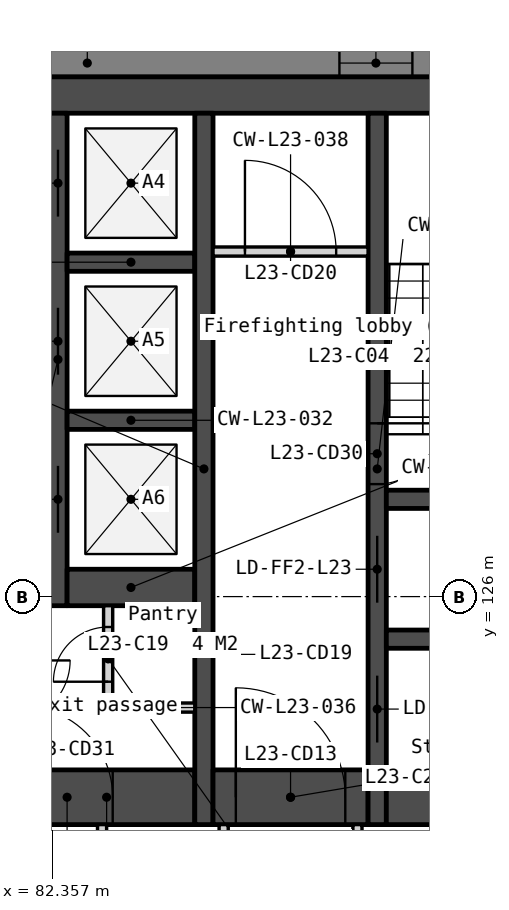
"""IFC4 building model, lengths in metres.
Left out: names, types, materials, properties, quantities, classifications, styles, units other than length and angle.
Written with IfcOpenShell. Run it as: python <this file> out.ifc"""

import sys

from ifc_helpers import new_model, si_unit, direction, frame, frame_2d, origin, place, context, subcontext, project, spatial, polyline, rectangle, outline, extrude, element, fill, save


model = new_model("IFC4")
c1 = context("Model", 3, precision=1e-05, world=origin(), true_north=direction((0.0, 1.0)))
c2 = subcontext(c1, "Body", "Model", "MODEL_VIEW")
j1 = project(units=[si_unit("LENGTHUNIT", "METRE"), si_unit("PLANEANGLEUNIT", "RADIAN")], contexts=[c1])
p1 = place(None, origin())
s1 = spatial("IfcSite", under=j1, at=p1, CompositionType="ELEMENT")
p2 = place(p1, origin())
s2 = spatial("IfcBuilding", under=s1, at=p2, CompositionType="ELEMENT")
p3 = place(p2, frame((0.0, 0.0, 95.8)))
s3 = spatial("IfcBuildingStorey", under=s2, at=p3, CompositionType="ELEMENT", Elevation=95.8)
p4 = place(p3, frame((66.0, 134.25, 0.0), z_axis=(0.0, 0.0, 1.0), x_axis=(1.0, 0.0, 0.0)))
e1 = element("IfcWall", 1, at=p4, inside=s3, PredefinedType="SOLIDWALL", context=c2, shape_type="SweptSolid", body=[
    extrude(rectangle(XDim=28.0, YDim=0.6, at=frame_2d((14.0, 0.0))), origin(), (0.0, 0.0, 1.0), 3.35),
])
p5 = place(p3, frame((81.8, 122.7, 0.0), z_axis=(0.0, 0.0, 1.0), x_axis=(1.0, 0.0, 0.0)))
e2 = element("IfcWall", 2, at=p5, inside=s3, PredefinedType="SOLIDWALL", context=c2, shape_type="SweptSolid", body=[
    extrude(rectangle(XDim=2.9, YDim=0.9, at=frame_2d((1.45, 0.0))), origin(), (0.0, 0.0, 1.0), 3.35),
])
p6 = place(p5, frame((0.05, 0.0, 0.0)))
e3 = element("IfcOpeningElement", 3, at=p6, cuts=e2, PredefinedType="OPENING", context=c2, shape_type="SweptSolid", body=[
    extrude(rectangle(XDim=1.5, YDim=2.1, at=frame_2d((0.75, 1.05))), frame((0.0, 0.46, 0.0), z_axis=(0.0, -1.0, 0.0), x_axis=(1.0, 0.0, 0.0)), (0.0, 0.0, 1.0), 0.92),
])
p7 = place(p3, frame((82.45, 133.95, 0.0), z_axis=(0.0, 0.0, 1.0), x_axis=(0.0, -1.0, 0.0)))
e4 = element("IfcWall", 4, at=p7, inside=s3, PredefinedType="SOLIDWALL", context=c2, shape_type="SweptSolid", body=[
    extrude(rectangle(XDim=8.1, YDim=0.3, at=frame_2d((4.05, 0.0))), origin(), (0.0, 0.0, 1.0), 3.35),
])
p8 = place(p7, frame((0.6, 0.0, 0.0)))
e5 = element("IfcOpeningElement", 5, at=p8, cuts=e4, PredefinedType="OPENING", context=c2, shape_type="SweptSolid", body=[
    extrude(rectangle(XDim=1.1, YDim=2.1, at=frame_2d((0.55, 1.05))), frame((0.0, 0.16, 0.0), z_axis=(0.0, -1.0, 0.0), x_axis=(1.0, 0.0, 0.0)), (0.0, 0.0, 1.0), 0.32),
])
p9 = place(p7, frame((3.2, 0.0, 0.0)))
e6 = element("IfcOpeningElement", 6, at=p9, cuts=e4, PredefinedType="OPENING", context=c2, shape_type="SweptSolid", body=[
    extrude(rectangle(XDim=1.1, YDim=2.1, at=frame_2d((0.55, 1.05))), frame((0.0, 0.16, 0.0), z_axis=(0.0, -1.0, 0.0), x_axis=(1.0, 0.0, 0.0)), (0.0, 0.0, 1.0), 0.32),
])
p10 = place(p7, frame((5.8, 0.0, 0.0)))
e7 = element("IfcOpeningElement", 7, at=p10, cuts=e4, PredefinedType="OPENING", context=c2, shape_type="SweptSolid", body=[
    extrude(rectangle(XDim=1.1, YDim=2.1, at=frame_2d((0.55, 1.05))), frame((0.0, 0.16, 0.0), z_axis=(0.0, -1.0, 0.0), x_axis=(1.0, 0.0, 0.0)), (0.0, 0.0, 1.0), 0.32),
])
for number, where, z_axis, x_axis in (
    (8, (82.6, 131.5, 0.0), (0.0, 0.0, 1.0), (1.0, 0.0, 0.0)),
    (9, (82.6, 128.9, 0.0), (0.0, 0.0, 1.0), (1.0, 0.0, 0.0)),
):
    element("IfcWall", number, at=place(p3, frame(where, z_axis=z_axis, x_axis=x_axis)), inside=s3, PredefinedType="SOLIDWALL", context=c2, shape_type="SweptSolid", body=[
        extrude(rectangle(XDim=2.1, YDim=0.3, at=frame_2d((1.05, 0.0))), origin(), (0.0, 0.0, 1.0), 3.35),
    ])
p11 = place(p3, frame((82.6, 126.15, 0.0), z_axis=(0.0, 0.0, 1.0), x_axis=(1.0, 0.0, 0.0)))
e10 = element("IfcWall", 10, at=p11, inside=s3, PredefinedType="SOLIDWALL", context=c2, shape_type="SweptSolid", body=[
    extrude(rectangle(XDim=2.1, YDim=0.6, at=frame_2d((1.05, 0.0))), origin(), (0.0, 0.0, 1.0), 3.35),
])
p12 = place(p3, frame((83.175, 122.25, 0.0), z_axis=(0.0, 0.0, 1.0), x_axis=(0.0, -1.0, 0.0)))
e11 = element("IfcWall", 11, at=p12, inside=s3, PredefinedType="PARTITIONING", context=c2, shape_type="SweptSolid", body=[
    extrude(rectangle(XDim=2.1, YDim=0.15, at=frame_2d((1.05, 0.0))), origin(), (0.0, 0.0, 1.0), 3.35),
])
p13 = place(p3, frame((83.275, 125.85, 0.0), z_axis=(0.0, 0.0, 1.0), x_axis=(0.0, -1.0, 0.0)))
e12 = element("IfcWall", 12, at=p13, inside=s3, PredefinedType="PARTITIONING", context=c2, shape_type="SweptSolid", body=[
    extrude(rectangle(XDim=1.75, YDim=0.15, at=frame_2d((0.875, 0.0))), origin(), (0.0, 0.0, 1.0), 3.35),
])
p14 = place(p13, frame((0.35, 0.0, 0.0)))
e13 = element("IfcOpeningElement", 13, at=p14, cuts=e12, PredefinedType="OPENING", context=c2, shape_type="SweptSolid", body=[
    extrude(rectangle(XDim=0.9, YDim=2.1, at=frame_2d((0.45, 1.05))), frame((0.0, 0.085, 0.0), z_axis=(0.0, -1.0, 0.0), x_axis=(1.0, 0.0, 0.0)), (0.0, 0.0, 1.0), 0.17),
])
p15 = place(p3, frame((83.35, 124.175, 0.0), z_axis=(0.0, 0.0, 1.0), x_axis=(1.0, 0.0, 0.0)))
e14 = element("IfcWall", 14, at=p15, inside=s3, PredefinedType="PARTITIONING", context=c2, shape_type="SweptSolid", body=[
    extrude(rectangle(XDim=1.35, YDim=0.15, at=frame_2d((0.675, 0.0))), origin(), (0.0, 0.0, 1.0), 3.35),
])
p16 = place(p3, frame((84.85, 133.95, 0.0), z_axis=(0.0, 0.0, 1.0), x_axis=(0.0, -1.0, 0.0)))
e15 = element("IfcWall", 15, at=p16, inside=s3, PredefinedType="SOLIDWALL", context=c2, shape_type="SweptSolid", body=[
    extrude(rectangle(XDim=11.7, YDim=0.3, at=frame_2d((5.85, 0.0))), origin(), (0.0, 0.0, 1.0), 3.35),
])
p17 = place(p3, frame((85.0, 131.675, 0.0), z_axis=(0.0, 0.0, 1.0), x_axis=(1.0, 0.0, 0.0)))
e16 = element("IfcWall", 16, at=p17, inside=s3, PredefinedType="PARTITIONING", context=c2, shape_type="SweptSolid", body=[
    extrude(rectangle(XDim=2.55, YDim=0.15, at=frame_2d((1.275, 0.0))), origin(), (0.0, 0.0, 1.0), 3.35),
])
p18 = place(p17, frame((0.525, 0.0, 0.0)))
e17 = element("IfcOpeningElement", 17, at=p18, cuts=e16, PredefinedType="OPENING", context=c2, shape_type="SweptSolid", body=[
    extrude(rectangle(XDim=1.5, YDim=2.1, at=frame_2d((0.75, 1.05))), frame((0.0, 0.085, 0.0), z_axis=(0.0, -1.0, 0.0), x_axis=(1.0, 0.0, 0.0)), (0.0, 0.0, 1.0), 0.17),
])
p19 = place(p3, frame((85.0, 122.7, 0.0), z_axis=(0.0, 0.0, 1.0), x_axis=(1.0, 0.0, 0.0)))
e18 = element("IfcWall", 18, at=p19, inside=s3, PredefinedType="SOLIDWALL", context=c2, shape_type="SweptSolid", body=[
    extrude(rectangle(XDim=2.55, YDim=0.9, at=frame_2d((1.275, 0.0))), origin(), (0.0, 0.0, 1.0), 3.35),
])
p20 = place(p19, frame((0.375, 0.0, 0.0)))
e19 = element("IfcOpeningElement", 19, at=p20, cuts=e18, PredefinedType="OPENING", context=c2, shape_type="SweptSolid", body=[
    extrude(rectangle(XDim=1.8, YDim=2.1, at=frame_2d((0.9, 1.05))), frame((0.0, 0.46, 0.0), z_axis=(0.0, -1.0, 0.0), x_axis=(1.0, 0.0, 0.0)), (0.0, 0.0, 1.0), 0.92),
])
p21 = place(p3, frame((85.175, 122.25, 0.0), z_axis=(0.0, 0.0, 1.0), x_axis=(0.0, -1.0, 0.0)))
e20 = element("IfcWall", 20, at=p21, inside=s3, PredefinedType="PARTITIONING", context=c2, shape_type="SweptSolid", body=[
    extrude(rectangle(XDim=2.1, YDim=0.15, at=frame_2d((1.05, 0.0))), origin(), (0.0, 0.0, 1.0), 3.35),
])
p22 = place(p21, frame((0.55, 0.0, 0.0)))
e21 = element("IfcOpeningElement", 21, at=p22, cuts=e20, PredefinedType="OPENING", context=c2, shape_type="SweptSolid", body=[
    extrude(rectangle(XDim=1.0, YDim=2.1, at=frame_2d((0.5, 1.05))), frame((0.0, 0.085, 0.0), z_axis=(0.0, -1.0, 0.0), x_axis=(1.0, 0.0, 0.0)), (0.0, 0.0, 1.0), 0.17),
])
p23 = place(p3, frame((87.375, 122.25, 0.0), z_axis=(0.0, 0.0, 1.0), x_axis=(0.0, -1.0, 0.0)))
e22 = element("IfcWall", 22, at=p23, inside=s3, PredefinedType="PARTITIONING", context=c2, shape_type="SweptSolid", body=[
    extrude(rectangle(XDim=2.1, YDim=0.15, at=frame_2d((1.05, 0.0))), origin(), (0.0, 0.0, 1.0), 3.35),
])
p24 = place(p3, frame((87.7, 133.95, 0.0), z_axis=(0.0, 0.0, 1.0), x_axis=(0.0, -1.0, 0.0)))
e23 = element("IfcWall", 23, at=p24, inside=s3, PredefinedType="SOLIDWALL", context=c2, shape_type="SweptSolid", body=[
    extrude(rectangle(XDim=11.7, YDim=0.3, at=frame_2d((5.85, 0.0))), origin(), (0.0, 0.0, 1.0), 3.35),
])
p25 = place(p24, frame((6.95, 0.0, 0.0)))
e24 = element("IfcOpeningElement", 24, at=p25, cuts=e23, PredefinedType="OPENING", context=c2, shape_type="SweptSolid", body=[
    extrude(rectangle(XDim=1.1, YDim=2.1, at=frame_2d((0.55, 1.05))), frame((0.0, 0.16, 0.0), z_axis=(0.0, -1.0, 0.0), x_axis=(1.0, 0.0, 0.0)), (0.0, 0.0, 1.0), 0.32),
])
p26 = place(p24, frame((5.1, 0.0, 0.0)))
e25 = element("IfcOpeningElement", 25, at=p26, cuts=e23, PredefinedType="OPENING", context=c2, shape_type="SweptSolid", body=[
    extrude(rectangle(XDim=1.0, YDim=2.1, at=frame_2d((0.5, 1.05))), frame((0.0, 0.16, 0.0), z_axis=(0.0, -1.0, 0.0), x_axis=(1.0, 0.0, 0.0)), (0.0, 0.0, 1.0), 0.32),
])
p27 = place(p24, frame((9.25, 0.0, 0.0)))
e26 = element("IfcOpeningElement", 26, at=p27, cuts=e23, PredefinedType="OPENING", context=c2, shape_type="SweptSolid", body=[
    extrude(rectangle(XDim=1.1, YDim=2.1, at=frame_2d((0.55, 1.05))), frame((0.0, 0.16, 0.0), z_axis=(0.0, -1.0, 0.0), x_axis=(1.0, 0.0, 0.0)), (0.0, 0.0, 1.0), 0.32),
])
for number, where, z_axis, x_axis in (
    (27, (87.85, 127.6, 0.0), (0.0, 0.0, 1.0), (1.0, 0.0, 0.0)),
    (28, (87.85, 125.3, 0.0), (0.0, 0.0, 1.0), (1.0, 0.0, 0.0)),
):
    element("IfcWall", number, at=place(p3, frame(where, z_axis=z_axis, x_axis=x_axis)), inside=s3, PredefinedType="SOLIDWALL", context=c2, shape_type="SweptSolid", body=[
        extrude(rectangle(XDim=2.55, YDim=0.3, at=frame_2d((1.275, 0.0))), origin(), (0.0, 0.0, 1.0), 3.35),
    ])
p28 = place(p3, frame((87.85, 122.7, 0.0), z_axis=(0.0, 0.0, 1.0), x_axis=(1.0, 0.0, 0.0)))
e29 = element("IfcWall", 29, at=p28, inside=s3, PredefinedType="SOLIDWALL", context=c2, shape_type="SweptSolid", body=[
    extrude(rectangle(XDim=2.55, YDim=0.9, at=frame_2d((1.275, 0.0))), origin(), (0.0, 0.0, 1.0), 3.35),
])
p29 = place(p3, frame((101.322, 134.775, -0.15), z_axis=(0.0, 0.0, 1.0), x_axis=(-1.0, 0.0, 0.0)))
e30 = element("IfcWall", 30, at=p29, inside=s3, PredefinedType="SOLIDWALL", context=c2, shape_type="SweptSolid", body=[
    extrude(outline(polyline([(0.0, 0.0), (0.0, 3.5), (36.779, 3.5), (36.779, 0.0), (0.0, 0.0)])), frame((0.0, 0.225, 0.0), z_axis=(0.0, -1.0, 0.0), x_axis=(1.0, 0.0, 0.0)), (0.0, 0.0, 1.0), 0.45),
])
p30 = place(p29, frame((2.814, 0.0, 1.05)))
e31 = element("IfcOpeningElement", 31, at=p30, cuts=e30, PredefinedType="OPENING", context=c2, shape_type="SweptSolid", body=[
    extrude(rectangle(XDim=1.2, YDim=1.5, at=frame_2d((0.6, 0.75))), frame((0.0, 0.235, 0.0), z_axis=(0.0, -1.0, 0.0), x_axis=(1.0, 0.0, 0.0)), (0.0, 0.0, 1.0), 0.47),
])
p31 = place(p29, frame((4.514, 0.0, 1.05)))
e32 = element("IfcOpeningElement", 32, at=p31, cuts=e30, PredefinedType="OPENING", context=c2, shape_type="SweptSolid", body=[
    extrude(rectangle(XDim=1.2, YDim=1.5, at=frame_2d((0.6, 0.75))), frame((0.0, 0.235, 0.0), z_axis=(0.0, -1.0, 0.0), x_axis=(1.0, 0.0, 0.0)), (0.0, 0.0, 1.0), 0.47),
])
p32 = place(p29, frame((11.343, 0.0, 1.05)))
e33 = element("IfcOpeningElement", 33, at=p32, cuts=e30, PredefinedType="OPENING", context=c2, shape_type="SweptSolid", body=[
    extrude(rectangle(XDim=1.2, YDim=1.5, at=frame_2d((0.6, 0.75))), frame((0.0, 0.235, 0.0), z_axis=(0.0, -1.0, 0.0), x_axis=(1.0, 0.0, 0.0)), (0.0, 0.0, 1.0), 0.47),
])
p33 = place(p29, frame((13.043, 0.0, 1.05)))
e34 = element("IfcOpeningElement", 34, at=p33, cuts=e30, PredefinedType="OPENING", context=c2, shape_type="SweptSolid", body=[
    extrude(rectangle(XDim=1.2, YDim=1.5, at=frame_2d((0.6, 0.75))), frame((0.0, 0.235, 0.0), z_axis=(0.0, -1.0, 0.0), x_axis=(1.0, 0.0, 0.0)), (0.0, 0.0, 1.0), 0.47),
])
p34 = place(p29, frame((19.872, 0.0, 1.05)))
e35 = element("IfcOpeningElement", 35, at=p34, cuts=e30, PredefinedType="OPENING", context=c2, shape_type="SweptSolid", body=[
    extrude(rectangle(XDim=1.2, YDim=1.5, at=frame_2d((0.6, 0.75))), frame((0.0, 0.235, 0.0), z_axis=(0.0, -1.0, 0.0), x_axis=(1.0, 0.0, 0.0)), (0.0, 0.0, 1.0), 0.47),
])
p35 = place(p29, frame((21.572, 0.0, 1.05)))
e36 = element("IfcOpeningElement", 36, at=p35, cuts=e30, PredefinedType="OPENING", context=c2, shape_type="SweptSolid", body=[
    extrude(rectangle(XDim=1.2, YDim=1.5, at=frame_2d((0.6, 0.75))), frame((0.0, 0.235, 0.0), z_axis=(0.0, -1.0, 0.0), x_axis=(1.0, 0.0, 0.0)), (0.0, 0.0, 1.0), 0.47),
])
p36 = place(p29, frame((28.4, 0.0, 1.05)))
e37 = element("IfcOpeningElement", 37, at=p36, cuts=e30, PredefinedType="OPENING", context=c2, shape_type="SweptSolid", body=[
    extrude(rectangle(XDim=1.2, YDim=1.5, at=frame_2d((0.6, 0.75))), frame((0.0, 0.235, 0.0), z_axis=(0.0, -1.0, 0.0), x_axis=(1.0, 0.0, 0.0)), (0.0, 0.0, 1.0), 0.47),
])
p37 = place(p29, frame((30.1, 0.0, 1.05)))
e38 = element("IfcOpeningElement", 38, at=p37, cuts=e30, PredefinedType="OPENING", context=c2, shape_type="SweptSolid", body=[
    extrude(rectangle(XDim=1.2, YDim=1.5, at=frame_2d((0.6, 0.75))), frame((0.0, 0.235, 0.0), z_axis=(0.0, -1.0, 0.0), x_axis=(1.0, 0.0, 0.0)), (0.0, 0.0, 1.0), 0.47),
])
p38 = place(p3, frame((82.605, 93.333, -0.15), z_axis=(0.0, 0.0, 1.0), x_axis=(0.500000478905, 0.866025127289, 0.0)))
e39 = element("IfcWall", 39, at=p38, inside=s3, PredefinedType="SOLIDWALL", context=c2, shape_type="SweptSolid", body=[
    extrude(outline(polyline([(42.643, 0.0), (42.643, 3.5), (0.0, 3.5), (0.0, 0.0), (42.643, 0.0)])), frame((0.0, 0.225, 0.0), z_axis=(0.0, -1.0, 0.0), x_axis=(1.0, 0.0, 0.0)), (0.0, 0.0, 1.0), 0.45),
])
p39 = place(p38, frame((2.814, 0.0, 1.05)))
e40 = element("IfcOpeningElement", 40, at=p39, cuts=e39, PredefinedType="OPENING", context=c2, shape_type="SweptSolid", body=[
    extrude(rectangle(XDim=1.2, YDim=1.5, at=frame_2d((0.6, 0.75))), frame((0.0, 0.235, 0.0), z_axis=(0.0, -1.0, 0.0), x_axis=(1.0, 0.0, 0.0)), (0.0, 0.0, 1.0), 0.47),
])
p40 = place(p38, frame((4.514, 0.0, 1.05)))
e41 = element("IfcOpeningElement", 41, at=p40, cuts=e39, PredefinedType="OPENING", context=c2, shape_type="SweptSolid", body=[
    extrude(rectangle(XDim=1.2, YDim=1.5, at=frame_2d((0.6, 0.75))), frame((0.0, 0.235, 0.0), z_axis=(0.0, -1.0, 0.0), x_axis=(1.0, 0.0, 0.0)), (0.0, 0.0, 1.0), 0.47),
])
p41 = place(p38, frame((11.343, 0.0, 1.05)))
e42 = element("IfcOpeningElement", 42, at=p41, cuts=e39, PredefinedType="OPENING", context=c2, shape_type="SweptSolid", body=[
    extrude(rectangle(XDim=1.2, YDim=1.5, at=frame_2d((0.6, 0.75))), frame((0.0, 0.235, 0.0), z_axis=(0.0, -1.0, 0.0), x_axis=(1.0, 0.0, 0.0)), (0.0, 0.0, 1.0), 0.47),
])
p42 = place(p38, frame((13.043, 0.0, 1.05)))
e43 = element("IfcOpeningElement", 43, at=p42, cuts=e39, PredefinedType="OPENING", context=c2, shape_type="SweptSolid", body=[
    extrude(rectangle(XDim=1.2, YDim=1.5, at=frame_2d((0.6, 0.75))), frame((0.0, 0.235, 0.0), z_axis=(0.0, -1.0, 0.0), x_axis=(1.0, 0.0, 0.0)), (0.0, 0.0, 1.0), 0.47),
])
p43 = place(p38, frame((19.872, 0.0, 1.05)))
e44 = element("IfcOpeningElement", 44, at=p43, cuts=e39, PredefinedType="OPENING", context=c2, shape_type="SweptSolid", body=[
    extrude(rectangle(XDim=1.2, YDim=1.5, at=frame_2d((0.6, 0.75))), frame((0.0, 0.235, 0.0), z_axis=(0.0, -1.0, 0.0), x_axis=(1.0, 0.0, 0.0)), (0.0, 0.0, 1.0), 0.47),
])
p44 = place(p38, frame((21.572, 0.0, 1.05)))
e45 = element("IfcOpeningElement", 45, at=p44, cuts=e39, PredefinedType="OPENING", context=c2, shape_type="SweptSolid", body=[
    extrude(rectangle(XDim=1.2, YDim=1.5, at=frame_2d((0.6, 0.75))), frame((0.0, 0.235, 0.0), z_axis=(0.0, -1.0, 0.0), x_axis=(1.0, 0.0, 0.0)), (0.0, 0.0, 1.0), 0.47),
])
p45 = place(p38, frame((28.4, 0.0, 1.05)))
e46 = element("IfcOpeningElement", 46, at=p45, cuts=e39, PredefinedType="OPENING", context=c2, shape_type="SweptSolid", body=[
    extrude(rectangle(XDim=1.2, YDim=1.5, at=frame_2d((0.6, 0.75))), frame((0.0, 0.235, 0.0), z_axis=(0.0, -1.0, 0.0), x_axis=(1.0, 0.0, 0.0)), (0.0, 0.0, 1.0), 0.47),
])
p46 = place(p38, frame((30.1, 0.0, 1.05)))
e47 = element("IfcOpeningElement", 47, at=p46, cuts=e39, PredefinedType="OPENING", context=c2, shape_type="SweptSolid", body=[
    extrude(rectangle(XDim=1.2, YDim=1.5, at=frame_2d((0.6, 0.75))), frame((0.0, 0.235, 0.0), z_axis=(0.0, -1.0, 0.0), x_axis=(1.0, 0.0, 0.0)), (0.0, 0.0, 1.0), 0.47),
])
p47 = place(p38, frame((36.929, 0.0, 1.05)))
e48 = element("IfcOpeningElement", 48, at=p47, cuts=e39, PredefinedType="OPENING", context=c2, shape_type="SweptSolid", body=[
    extrude(rectangle(XDim=1.2, YDim=1.5, at=frame_2d((0.6, 0.75))), frame((0.0, 0.235, 0.0), z_axis=(0.0, -1.0, 0.0), x_axis=(1.0, 0.0, 0.0)), (0.0, 0.0, 1.0), 0.47),
])
p48 = place(p38, frame((38.629, 0.0, 1.05)))
e49 = element("IfcOpeningElement", 49, at=p48, cuts=e39, PredefinedType="OPENING", context=c2, shape_type="SweptSolid", body=[
    extrude(rectangle(XDim=1.2, YDim=1.5, at=frame_2d((0.6, 0.75))), frame((0.0, 0.235, 0.0), z_axis=(0.0, -1.0, 0.0), x_axis=(1.0, 0.0, 0.0)), (0.0, 0.0, 1.0), 0.47),
])
p49 = place(p8, origin())
e50 = element("IfcDoor", 50, at=p49, inside=s3, OperationType="SLIDING_TO_LEFT", PredefinedType="DOOR", context=c2, shape_type="SweptSolid", body=[
    extrude(rectangle(XDim=1.1, YDim=2.1, at=frame_2d((0.55, 1.05))), frame((0.0, 0.025, 0.0), z_axis=(0.0, -1.0, 0.0), x_axis=(1.0, 0.0, 0.0)), (0.0, 0.0, 1.0), 0.05),
])
fill(e5, e50)
p50 = place(p9, origin())
e51 = element("IfcDoor", 51, at=p50, inside=s3, OperationType="SLIDING_TO_LEFT", PredefinedType="DOOR", context=c2, shape_type="SweptSolid", body=[
    extrude(rectangle(XDim=1.1, YDim=2.1, at=frame_2d((0.55, 1.05))), frame((0.0, 0.025, 0.0), z_axis=(0.0, -1.0, 0.0), x_axis=(1.0, 0.0, 0.0)), (0.0, 0.0, 1.0), 0.05),
])
fill(e6, e51)
p51 = place(p10, origin())
e52 = element("IfcDoor", 52, at=p51, inside=s3, OperationType="SLIDING_TO_LEFT", PredefinedType="DOOR", context=c2, shape_type="SweptSolid", body=[
    extrude(rectangle(XDim=1.1, YDim=2.1, at=frame_2d((0.55, 1.05))), frame((0.0, 0.025, 0.0), z_axis=(0.0, -1.0, 0.0), x_axis=(1.0, 0.0, 0.0)), (0.0, 0.0, 1.0), 0.05),
])
fill(e7, e52)
p52 = place(p25, origin())
e53 = element("IfcDoor", 53, at=p52, inside=s3, OperationType="SLIDING_TO_LEFT", PredefinedType="DOOR", context=c2, shape_type="SweptSolid", body=[
    extrude(rectangle(XDim=1.1, YDim=2.1, at=frame_2d((0.55, 1.05))), frame((0.0, 0.025, 0.0), z_axis=(0.0, -1.0, 0.0), x_axis=(1.0, 0.0, 0.0)), (0.0, 0.0, 1.0), 0.05),
])
fill(e24, e53)
p53 = place(p20, origin())
e54 = element("IfcDoor", 54, at=p53, inside=s3, OperationType="DOUBLE_DOOR_DOUBLE_SWING", PredefinedType="DOOR", context=c2, shape_type="SweptSolid", body=[
    extrude(rectangle(XDim=1.8, YDim=2.1, at=frame_2d((0.9, 1.05))), frame((0.0, 0.025, 0.0), z_axis=(0.0, -1.0, 0.0), x_axis=(1.0, 0.0, 0.0)), (0.0, 0.0, 1.0), 0.05),
])
fill(e19, e54)
p54 = place(p6, origin())
e55 = element("IfcDoor", 55, at=p54, inside=s3, OperationType="DOUBLE_DOOR_DOUBLE_SWING", PredefinedType="DOOR", context=c2, shape_type="SweptSolid", body=[
    extrude(rectangle(XDim=1.5, YDim=2.1, at=frame_2d((0.75, 1.05))), frame((0.0, 0.025, 0.0), z_axis=(0.0, -1.0, 0.0), x_axis=(1.0, 0.0, 0.0)), (0.0, 0.0, 1.0), 0.05),
])
fill(e3, e55)
p55 = place(p14, origin())
e56 = element("IfcDoor", 56, at=p55, inside=s3, OperationType="SINGLE_SWING_RIGHT", PredefinedType="DOOR", context=c2, shape_type="SweptSolid", body=[
    extrude(rectangle(XDim=0.9, YDim=2.1, at=frame_2d((0.45, 1.05))), frame((0.0, 0.025, 0.0), z_axis=(0.0, -1.0, 0.0), x_axis=(1.0, 0.0, 0.0)), (0.0, 0.0, 1.0), 0.05),
])
fill(e13, e56)
p56 = place(p18, origin())
e57 = element("IfcDoor", 57, at=p56, inside=s3, OperationType="DOUBLE_DOOR_DOUBLE_SWING", PredefinedType="DOOR", context=c2, shape_type="SweptSolid", body=[
    extrude(rectangle(XDim=1.5, YDim=2.1, at=frame_2d((0.75, 1.05))), frame((0.0, 0.025, 0.0), z_axis=(0.0, -1.0, 0.0), x_axis=(1.0, 0.0, 0.0)), (0.0, 0.0, 1.0), 0.05),
])
fill(e17, e57)
p57 = place(p26, origin())
e58 = element("IfcDoor", 58, at=p57, inside=s3, OperationType="SINGLE_SWING_LEFT", PredefinedType="DOOR", context=c2, shape_type="SweptSolid", body=[
    extrude(rectangle(XDim=1.0, YDim=2.1, at=frame_2d((0.5, 1.05))), frame((0.0, 0.025, 0.0), z_axis=(0.0, -1.0, 0.0), x_axis=(1.0, 0.0, 0.0)), (0.0, 0.0, 1.0), 0.05),
])
fill(e25, e58)
p58 = place(p27, origin())
e59 = element("IfcDoor", 59, at=p58, inside=s3, OperationType="SLIDING_TO_LEFT", PredefinedType="DOOR", context=c2, shape_type="SweptSolid", body=[
    extrude(rectangle(XDim=1.1, YDim=2.1, at=frame_2d((0.55, 1.05))), frame((0.0, 0.025, 0.0), z_axis=(0.0, -1.0, 0.0), x_axis=(1.0, 0.0, 0.0)), (0.0, 0.0, 1.0), 0.05),
])
fill(e26, e59)
p59 = place(p33, origin())
e60 = element("IfcWindow", 60, at=p59, inside=s3, PartitioningType="SINGLE_PANEL", PredefinedType="WINDOW", context=c2, shape_type="SweptSolid", body=[
    extrude(rectangle(XDim=1.2, YDim=1.5, at=frame_2d((0.6, 0.75))), frame((0.0, 0.03, 0.0), z_axis=(0.0, -1.0, 0.0), x_axis=(1.0, 0.0, 0.0)), (0.0, 0.0, 1.0), 0.06),
])
fill(e34, e60)
save(model, sys.argv[1])
